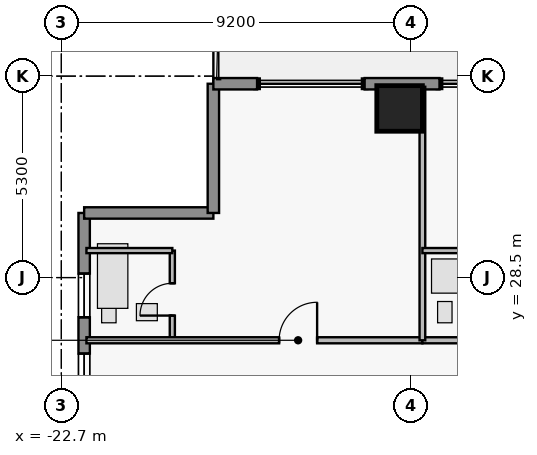
"""IFC4 building model, lengths in metres.
Left out: names, types, materials, properties, quantities, classifications, styles, units other than length and angle.
Written with IfcOpenShell. Run it as: python <this file> out.ifc"""

import sys

from ifc_helpers import new_model, si_unit, direction, frame, frame_2d, origin, origin_2d, place, context, subcontext, project, spatial, rectangle, extrude, element, fill, save


model = new_model("IFC4")
c1 = context("Model", 3, precision=1e-05, world=origin(), true_north=direction((0.0, 1.0)))
c2 = subcontext(c1, "Body", "Model", "MODEL_VIEW")
j1 = project(units=[si_unit("LENGTHUNIT", "METRE"), si_unit("PLANEANGLEUNIT", "RADIAN")], contexts=[c1])
p1 = place(None, origin())
s1 = spatial("IfcSite", under=j1, at=p1, CompositionType="ELEMENT")
p2 = place(p1, origin())
s2 = spatial("IfcBuilding", under=s1, at=p2, CompositionType="ELEMENT")
p3 = place(p2, frame((0.0, 0.0, 203.65)))
s3 = spatial("IfcBuildingStorey", under=s2, at=p3, CompositionType="ELEMENT", Elevation=203.65)
p4 = place(p3, frame((-13.8, 32.95, 0.0), z_axis=(0.0, 0.0, 1.0), x_axis=(1.0, 0.0, 0.0)))
e1 = element("IfcColumn", 1, at=p4, inside=s3, PredefinedType="COLUMN", context=c2, shape_type="SweptSolid", body=[
    extrude(rectangle(XDim=1.2, YDim=1.2, at=origin_2d()), origin(), (0.0, 0.0, 1.0), 3.75),
])
p5 = place(p3, frame((-22.1, 24.55, 0.0), z_axis=(0.0, 0.0, 1.0), x_axis=(0.0, 1.0, 0.0)))
e2 = element("IfcWall", 2, at=p5, inside=s3, PredefinedType="STANDARD", context=c2, shape_type="SweptSolid", body=[
    extrude(rectangle(XDim=5.65, YDim=0.3, at=frame_2d((2.825, 0.0))), origin(), (0.0, 0.0, 1.0), 3.53),
])
p6 = place(p5, frame((0.8, 0.0, 0.95)))
e3 = element("IfcOpeningElement", 3, at=p6, cuts=e2, PredefinedType="OPENING", context=c2, shape_type="SweptSolid", body=[
    extrude(rectangle(XDim=1.15, YDim=1.55, at=frame_2d((0.575, 0.775))), frame((0.0, 0.16, 0.0), z_axis=(0.0, -1.0, 0.0), x_axis=(1.0, 0.0, 0.0)), (0.0, 0.0, 1.0), 0.32),
])
p7 = place(p5, frame((2.905, 0.0, 0.95)))
e4 = element("IfcOpeningElement", 4, at=p7, cuts=e2, PredefinedType="OPENING", context=c2, shape_type="SweptSolid", body=[
    extrude(rectangle(XDim=1.15, YDim=1.55, at=frame_2d((0.575, 0.775))), frame((0.0, 0.16, 0.0), z_axis=(0.0, -1.0, 0.0), x_axis=(1.0, 0.0, 0.0)), (0.0, 0.0, 1.0), 0.32),
])
for number, where, z_axis, x_axis in (
    (5, (-22.1, 30.2, 0.0), (0.0, 0.0, 1.0), (1.0, 0.0, 0.0)),
    (6, (-18.7, 30.2, 0.0), (0.0, 0.0, 1.0), (0.0, 1.0, 0.0)),
):
    element("IfcWall", number, at=place(p3, frame(where, z_axis=z_axis, x_axis=x_axis)), inside=s3, PredefinedType="STANDARD", context=c2, shape_type="SweptSolid", body=[
        extrude(rectangle(XDim=3.4, YDim=0.3, at=frame_2d((1.7, 0.0))), origin(), (0.0, 0.0, 1.0), 3.53),
    ])
p8 = place(p3, frame((-18.7, 33.6, 0.0), z_axis=(0.0, 0.0, 1.0), x_axis=(1.0, 0.0, 0.0)))
e7 = element("IfcWall", 7, at=p8, inside=s3, PredefinedType="STANDARD", context=c2, shape_type="SweptSolid", body=[
    extrude(rectangle(XDim=1.15, YDim=0.3, at=frame_2d((0.575, 0.0))), origin(), (0.0, 0.0, 1.0), 3.53),
])
p9 = place(p3, frame((-14.72, 33.6, 0.0), z_axis=(0.0, 0.0, 1.0), x_axis=(1.0, 0.0, 0.0)))
e8 = element("IfcWall", 8, at=p9, inside=s3, PredefinedType="STANDARD", context=c2, shape_type="SweptSolid", body=[
    extrude(rectangle(XDim=1.97, YDim=0.3, at=frame_2d((0.985, 0.0))), origin(), (0.0, 0.0, 1.0), 3.53),
])
p10 = place(p3, frame((-19.78, 26.85, 0.0), z_axis=(0.0, 0.0, 1.0), x_axis=(0.0, 1.0, 0.0)))
e9 = element("IfcWall", 9, at=p10, inside=s3, PredefinedType="PLUMBINGWALL", context=c2, shape_type="SweptSolid", body=[
    extrude(rectangle(XDim=2.36, YDim=0.135, at=frame_2d((1.18, 0.0))), origin(), (0.0, 0.0, 1.0), 3.53),
])
p11 = place(p10, frame((0.65, 0.0, 0.0)))
e10 = element("IfcOpeningElement", 10, at=p11, cuts=e9, PredefinedType="OPENING", context=c2, shape_type="SweptSolid", body=[
    extrude(rectangle(XDim=0.85, YDim=2.1, at=frame_2d((0.425, 1.05))), frame((0.0, 0.077, 0.0), z_axis=(0.0, -1.0, 0.0), x_axis=(1.0, 0.0, 0.0)), (0.0, 0.0, 1.0), 0.155),
])
p12 = place(p3, frame((-22.04, 26.85, 0.0), z_axis=(0.0, 0.0, 1.0), x_axis=(1.0, 0.0, 0.0)))
e11 = element("IfcWall", 11, at=p12, inside=s3, PredefinedType="PARTITIONING", context=c2, shape_type="SweptSolid", body=[
    extrude(rectangle(XDim=8.84, YDim=0.16, at=frame_2d((4.42, 0.0))), origin(), (0.0, 0.0, 1.0), 3.53),
])
p13 = place(p12, frame((5.07, 0.0, 0.0)))
e12 = element("IfcOpeningElement", 12, at=p13, cuts=e11, PredefinedType="OPENING", context=c2, shape_type="SweptSolid", body=[
    extrude(rectangle(XDim=1.0, YDim=2.15, at=frame_2d((0.5, 1.075))), frame((0.0, 0.09, 0.0), z_axis=(0.0, -1.0, 0.0), x_axis=(1.0, 0.0, 0.0)), (0.0, 0.0, 1.0), 0.18),
])
p14 = place(p3, frame((-13.2, 26.85, 0.0), z_axis=(0.0, 0.0, 1.0), x_axis=(1.0, 0.0, 0.0)))
e13 = element("IfcWall", 13, at=p14, inside=s3, PredefinedType="PARTITIONING", context=c2, shape_type="SweptSolid", body=[
    extrude(rectangle(XDim=5.2, YDim=0.16, at=frame_2d((2.6, 0.0))), origin(), (0.0, 0.0, 1.0), 3.53),
])
p15 = place(p14, frame((3.275, 0.0, 0.0)))
e14 = element("IfcOpeningElement", 14, at=p15, cuts=e13, PredefinedType="OPENING", context=c2, shape_type="SweptSolid", body=[
    extrude(rectangle(XDim=0.95, YDim=2.15, at=frame_2d((0.475, 1.075))), frame((0.0, 0.09, 0.0), z_axis=(0.0, -1.0, 0.0), x_axis=(1.0, 0.0, 0.0)), (0.0, 0.0, 1.0), 0.18),
])
p16 = place(p3, frame((-22.04, 29.21, 0.0), z_axis=(0.0, 0.0, 1.0), x_axis=(1.0, 0.0, 0.0)))
e15 = element("IfcWall", 15, at=p16, inside=s3, PredefinedType="PLUMBINGWALL", context=c2, shape_type="SweptSolid", body=[
    extrude(rectangle(XDim=2.26, YDim=0.135, at=frame_2d((1.13, 0.0))), origin(), (0.0, 0.0, 1.0), 3.53),
])
p17 = place(p3, frame((-13.2, 26.85, 0.0), z_axis=(0.0, 0.0, 1.0), x_axis=(0.0, 1.0, 0.0)))
e16 = element("IfcWall", 16, at=p17, inside=s3, PredefinedType="PARTITIONING", context=c2, shape_type="SweptSolid", body=[
    extrude(rectangle(XDim=6.67, YDim=0.15, at=frame_2d((3.335, 0.0))), origin(), (0.0, 0.0, 1.0), 3.53),
])
p18 = place(p3, frame((-13.2, 29.21, 0.0), z_axis=(0.0, 0.0, 1.0), x_axis=(1.0, 0.0, 0.0)))
e17 = element("IfcWall", 17, at=p18, inside=s3, PredefinedType="PLUMBINGWALL", context=c2, shape_type="SweptSolid", body=[
    extrude(rectangle(XDim=2.26, YDim=0.135, at=frame_2d((1.13, 0.0))), origin(), (0.0, 0.0, 1.0), 3.53),
])
p19 = place(p6, origin())
e18 = element("IfcWindow", 18, at=p19, inside=s3, PartitioningType="SINGLE_PANEL", PredefinedType="WINDOW", context=c2, shape_type="SweptSolid", body=[
    extrude(rectangle(XDim=1.15, YDim=1.55, at=frame_2d((0.575, 0.775))), frame((0.0, 0.03, 0.0), z_axis=(0.0, -1.0, 0.0), x_axis=(1.0, 0.0, 0.0)), (0.0, 0.0, 1.0), 0.06),
])
fill(e3, e18)
p20 = place(p7, origin())
e19 = element("IfcWindow", 19, at=p20, inside=s3, PartitioningType="SINGLE_PANEL", PredefinedType="WINDOW", context=c2, shape_type="SweptSolid", body=[
    extrude(rectangle(XDim=1.15, YDim=1.55, at=frame_2d((0.575, 0.775))), frame((0.0, 0.03, 0.0), z_axis=(0.0, -1.0, 0.0), x_axis=(1.0, 0.0, 0.0)), (0.0, 0.0, 1.0), 0.06),
])
fill(e4, e19)
p21 = place(p11, origin())
e20 = element("IfcDoor", 20, at=p21, inside=s3, OperationType="SINGLE_SWING_LEFT", PredefinedType="DOOR", context=c2, shape_type="SweptSolid", body=[
    extrude(rectangle(XDim=0.85, YDim=2.1, at=frame_2d((0.425, 1.05))), frame((0.0, 0.025, 0.0), z_axis=(0.0, -1.0, 0.0), x_axis=(1.0, 0.0, 0.0)), (0.0, 0.0, 1.0), 0.05),
])
fill(e10, e20)
p22 = place(p13, origin())
e21 = element("IfcDoor", 21, at=p22, inside=s3, OperationType="SINGLE_SWING_RIGHT", PredefinedType="DOOR", context=c2, shape_type="SweptSolid", body=[
    extrude(rectangle(XDim=1.0, YDim=2.15, at=frame_2d((0.5, 1.075))), frame((0.0, 0.025, 0.0), z_axis=(0.0, -1.0, 0.0), x_axis=(1.0, 0.0, 0.0)), (0.0, 0.0, 1.0), 0.05),
])
fill(e12, e21)
save(model, sys.argv[1])
